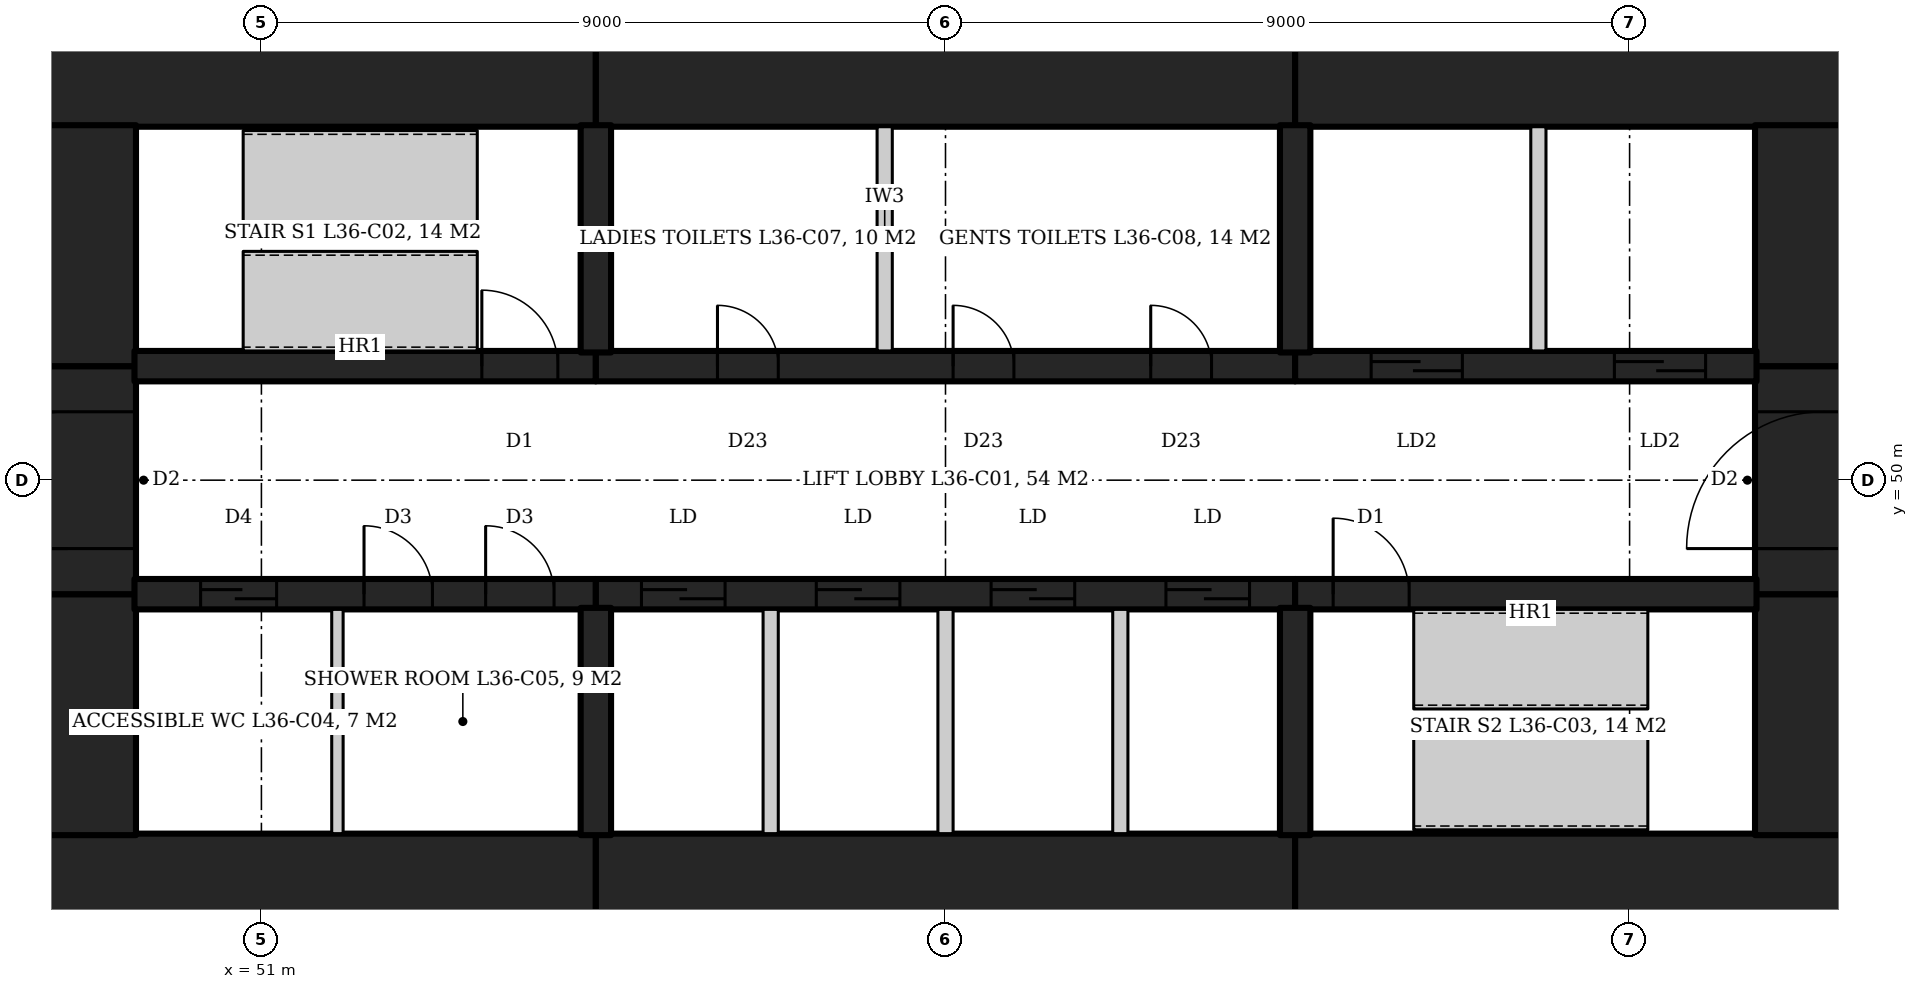
"""IFC4 building model, lengths in metres.
Left out: names, types, materials, properties, quantities, classifications, styles, units other than length and angle.
Written with IfcOpenShell. Run it as: python <this file> out.ifc"""

import sys

from ifc_helpers import new_model, si_unit, direction, frame, frame_2d, origin, place, context, subcontext, project, spatial, rectangle, extrude, element, fill, save


model = new_model("IFC4")
c1 = context("Model", 3, precision=1e-05, world=origin(), true_north=direction((0.0, 1.0)))
c2 = subcontext(c1, "Body", "Model", "MODEL_VIEW")
j1 = project(units=[si_unit("LENGTHUNIT", "METRE"), si_unit("PLANEANGLEUNIT", "RADIAN")], contexts=[c1])
p1 = place(None, origin())
s1 = spatial("IfcSite", under=j1, at=p1, CompositionType="ELEMENT")
p2 = place(p1, origin())
s2 = spatial("IfcBuilding", under=s1, at=p2, CompositionType="ELEMENT")
p3 = place(p2, frame((0.0, 0.0, 160.4)))
s3 = spatial("IfcBuildingStorey", under=s2, at=p3, CompositionType="ELEMENT", Elevation=160.4)
p4 = place(p3, frame((47.55, 55.55, 0.0), z_axis=(0.0, 0.0, 1.0), x_axis=(1.0, 0.0, 0.0)))
e1 = element("IfcWall", 1, at=p4, inside=s3, PredefinedType="SHEAR", context=c2, shape_type="SweptSolid", body=[
    extrude(rectangle(XDim=7.85, YDim=1.8, at=frame_2d((3.925, 0.0))), origin(), (0.0, 0.0, 1.0), 4.2),
])
p5 = place(p3, frame((55.4, 55.55, 0.0), z_axis=(0.0, 0.0, 1.0), x_axis=(1.0, 0.0, 0.0)))
e2 = element("IfcWall", 2, at=p5, inside=s3, PredefinedType="SHEAR", context=c2, shape_type="SweptSolid", body=[
    extrude(rectangle(XDim=9.2, YDim=1.8, at=frame_2d((4.6, 0.0))), origin(), (0.0, 0.0, 1.0), 4.2),
])
for number, where, z_axis, x_axis in (
    (3, (64.6, 55.55, 0.0), (0.0, 0.0, 1.0), (1.0, 0.0, 0.0)),
    (4, (47.55, 44.45, 0.0), (0.0, 0.0, 1.0), (1.0, 0.0, 0.0)),
):
    element("IfcWall", number, at=place(p3, frame(where, z_axis=z_axis, x_axis=x_axis)), inside=s3, PredefinedType="SHEAR", context=c2, shape_type="SweptSolid", body=[
        extrude(rectangle(XDim=7.85, YDim=1.8, at=frame_2d((3.925, 0.0))), origin(), (0.0, 0.0, 1.0), 4.2),
    ])
p6 = place(p3, frame((55.4, 44.45, 0.0), z_axis=(0.0, 0.0, 1.0), x_axis=(1.0, 0.0, 0.0)))
e5 = element("IfcWall", 5, at=p6, inside=s3, PredefinedType="SHEAR", context=c2, shape_type="SweptSolid", body=[
    extrude(rectangle(XDim=9.2, YDim=1.8, at=frame_2d((4.6, 0.0))), origin(), (0.0, 0.0, 1.0), 4.2),
])
p7 = place(p3, frame((64.6, 44.45, 0.0), z_axis=(0.0, 0.0, 1.0), x_axis=(1.0, 0.0, 0.0)))
e6 = element("IfcWall", 6, at=p7, inside=s3, PredefinedType="SHEAR", context=c2, shape_type="SweptSolid", body=[
    extrude(rectangle(XDim=7.85, YDim=1.8, at=frame_2d((3.925, 0.0))), origin(), (0.0, 0.0, 1.0), 4.2),
])
p8 = place(p3, frame((71.55, 45.33, 0.0), z_axis=(0.0, 0.0, 1.0), x_axis=(0.0, 1.0, 0.0)))
e7 = element("IfcWall", 7, at=p8, inside=s3, PredefinedType="SHEAR", context=c2, shape_type="SweptSolid", body=[
    extrude(rectangle(XDim=3.17, YDim=1.8, at=frame_2d((1.585, 0.0))), origin(), (0.0, 0.0, 1.0), 4.2),
])
p9 = place(p3, frame((71.55, 48.5, 0.0), z_axis=(0.0, 0.0, 1.0), x_axis=(0.0, 1.0, 0.0)))
e8 = element("IfcWall", 8, at=p9, inside=s3, PredefinedType="SHEAR", context=c2, shape_type="SweptSolid", body=[
    extrude(rectangle(XDim=3.0, YDim=1.8, at=frame_2d((1.5, 0.0))), origin(), (0.0, 0.0, 1.0), 4.2),
])
p10 = place(p9, frame((0.6, 0.0, 0.0)))
e9 = element("IfcOpeningElement", 9, at=p10, cuts=e8, PredefinedType="OPENING", context=c2, shape_type="SweptSolid", body=[
    extrude(rectangle(XDim=1.8, YDim=2.1, at=frame_2d((0.9, 1.05))), frame((0.0, 0.91, 0.0), z_axis=(0.0, -1.0, 0.0), x_axis=(1.0, 0.0, 0.0)), (0.0, 0.0, 1.0), 1.82),
])
for number, where, z_axis, x_axis in (
    (10, (71.55, 51.5, 0.0), (0.0, 0.0, 1.0), (0.0, 1.0, 0.0)),
    (11, (48.45, 45.33, 0.0), (0.0, 0.0, 1.0), (0.0, 1.0, 0.0)),
):
    element("IfcWall", number, at=place(p3, frame(where, z_axis=z_axis, x_axis=x_axis)), inside=s3, PredefinedType="SHEAR", context=c2, shape_type="SweptSolid", body=[
        extrude(rectangle(XDim=3.17, YDim=1.8, at=frame_2d((1.585, 0.0))), origin(), (0.0, 0.0, 1.0), 4.2),
    ])
p11 = place(p3, frame((48.45, 48.5, 0.0), z_axis=(0.0, 0.0, 1.0), x_axis=(0.0, 1.0, 0.0)))
e12 = element("IfcWall", 12, at=p11, inside=s3, PredefinedType="SHEAR", context=c2, shape_type="SweptSolid", body=[
    extrude(rectangle(XDim=3.0, YDim=1.8, at=frame_2d((1.5, 0.0))), origin(), (0.0, 0.0, 1.0), 4.2),
])
p12 = place(p11, frame((0.6, 0.0, 0.0)))
e13 = element("IfcOpeningElement", 13, at=p12, cuts=e12, PredefinedType="OPENING", context=c2, shape_type="SweptSolid", body=[
    extrude(rectangle(XDim=1.8, YDim=2.1, at=frame_2d((0.9, 1.05))), frame((0.0, 0.91, 0.0), z_axis=(0.0, -1.0, 0.0), x_axis=(1.0, 0.0, 0.0)), (0.0, 0.0, 1.0), 1.82),
])
p13 = place(p3, frame((48.45, 51.5, 0.0), z_axis=(0.0, 0.0, 1.0), x_axis=(0.0, 1.0, 0.0)))
e14 = element("IfcWall", 14, at=p13, inside=s3, PredefinedType="SHEAR", context=c2, shape_type="SweptSolid", body=[
    extrude(rectangle(XDim=3.17, YDim=1.8, at=frame_2d((1.585, 0.0))), origin(), (0.0, 0.0, 1.0), 4.2),
])
p14 = place(p3, frame((49.33, 51.5, 0.0), z_axis=(0.0, 0.0, 1.0), x_axis=(1.0, 0.0, 0.0)))
e15 = element("IfcWall", 15, at=p14, inside=s3, PredefinedType="SHEAR", context=c2, shape_type="SweptSolid", body=[
    extrude(rectangle(XDim=6.07, YDim=0.4, at=frame_2d((3.035, 0.0))), origin(), (0.0, 0.0, 1.0), 4.2),
])
p15 = place(p14, frame((4.57, 0.0, 0.0)))
e16 = element("IfcOpeningElement", 16, at=p15, cuts=e15, PredefinedType="OPENING", context=c2, shape_type="SweptSolid", body=[
    extrude(rectangle(XDim=1.0, YDim=2.1, at=frame_2d((0.5, 1.05))), frame((0.0, 0.21, 0.0), z_axis=(0.0, -1.0, 0.0), x_axis=(1.0, 0.0, 0.0)), (0.0, 0.0, 1.0), 0.42),
])
p16 = place(p3, frame((55.4, 51.5, 0.0), z_axis=(0.0, 0.0, 1.0), x_axis=(1.0, 0.0, 0.0)))
e17 = element("IfcWall", 17, at=p16, inside=s3, PredefinedType="SHEAR", context=c2, shape_type="SweptSolid", body=[
    extrude(rectangle(XDim=9.2, YDim=0.4, at=frame_2d((4.6, 0.0))), origin(), (0.0, 0.0, 1.0), 4.2),
])
p17 = place(p16, frame((1.6, 0.0, 0.0)))
e18 = element("IfcOpeningElement", 18, at=p17, cuts=e17, PredefinedType="OPENING", context=c2, shape_type="SweptSolid", body=[
    extrude(rectangle(XDim=0.8, YDim=2.1, at=frame_2d((0.4, 1.05))), frame((0.0, 0.21, 0.0), z_axis=(0.0, -1.0, 0.0), x_axis=(1.0, 0.0, 0.0)), (0.0, 0.0, 1.0), 0.42),
])
p18 = place(p16, frame((4.7, 0.0, 0.0)))
e19 = element("IfcOpeningElement", 19, at=p18, cuts=e17, PredefinedType="OPENING", context=c2, shape_type="SweptSolid", body=[
    extrude(rectangle(XDim=0.8, YDim=2.1, at=frame_2d((0.4, 1.05))), frame((0.0, 0.21, 0.0), z_axis=(0.0, -1.0, 0.0), x_axis=(1.0, 0.0, 0.0)), (0.0, 0.0, 1.0), 0.42),
])
p19 = place(p16, frame((7.3, 0.0, 0.0)))
e20 = element("IfcOpeningElement", 20, at=p19, cuts=e17, PredefinedType="OPENING", context=c2, shape_type="SweptSolid", body=[
    extrude(rectangle(XDim=0.8, YDim=2.1, at=frame_2d((0.4, 1.05))), frame((0.0, 0.21, 0.0), z_axis=(0.0, -1.0, 0.0), x_axis=(1.0, 0.0, 0.0)), (0.0, 0.0, 1.0), 0.42),
])
p20 = place(p3, frame((64.6, 51.5, 0.0), z_axis=(0.0, 0.0, 1.0), x_axis=(1.0, 0.0, 0.0)))
e21 = element("IfcWall", 21, at=p20, inside=s3, PredefinedType="SHEAR", context=c2, shape_type="SweptSolid", body=[
    extrude(rectangle(XDim=6.07, YDim=0.4, at=frame_2d((3.035, 0.0))), origin(), (0.0, 0.0, 1.0), 4.2),
])
p21 = place(p20, frame((1.0, 0.0, 0.0)))
e22 = element("IfcOpeningElement", 22, at=p21, cuts=e21, PredefinedType="OPENING", context=c2, shape_type="SweptSolid", body=[
    extrude(rectangle(XDim=1.2, YDim=2.1, at=frame_2d((0.6, 1.05))), frame((0.0, 0.21, 0.0), z_axis=(0.0, -1.0, 0.0), x_axis=(1.0, 0.0, 0.0)), (0.0, 0.0, 1.0), 0.42),
])
p22 = place(p20, frame((4.2, 0.0, 0.0)))
e23 = element("IfcOpeningElement", 23, at=p22, cuts=e21, PredefinedType="OPENING", context=c2, shape_type="SweptSolid", body=[
    extrude(rectangle(XDim=1.2, YDim=2.1, at=frame_2d((0.6, 1.05))), frame((0.0, 0.21, 0.0), z_axis=(0.0, -1.0, 0.0), x_axis=(1.0, 0.0, 0.0)), (0.0, 0.0, 1.0), 0.42),
])
p23 = place(p3, frame((49.33, 48.5, 0.0), z_axis=(0.0, 0.0, 1.0), x_axis=(1.0, 0.0, 0.0)))
e24 = element("IfcWall", 24, at=p23, inside=s3, PredefinedType="SHEAR", context=c2, shape_type="SweptSolid", body=[
    extrude(rectangle(XDim=6.07, YDim=0.4, at=frame_2d((3.035, 0.0))), origin(), (0.0, 0.0, 1.0), 4.2),
])
p24 = place(p23, frame((0.87, 0.0, 0.0)))
e25 = element("IfcOpeningElement", 25, at=p24, cuts=e24, PredefinedType="OPENING", context=c2, shape_type="SweptSolid", body=[
    extrude(rectangle(XDim=1.0, YDim=2.1, at=frame_2d((0.5, 1.05))), frame((0.0, 0.21, 0.0), z_axis=(0.0, -1.0, 0.0), x_axis=(1.0, 0.0, 0.0)), (0.0, 0.0, 1.0), 0.42),
])
p25 = place(p23, frame((3.02, 0.0, 0.0)))
e26 = element("IfcOpeningElement", 26, at=p25, cuts=e24, PredefinedType="OPENING", context=c2, shape_type="SweptSolid", body=[
    extrude(rectangle(XDim=0.9, YDim=2.1, at=frame_2d((0.45, 1.05))), frame((0.0, 0.21, 0.0), z_axis=(0.0, -1.0, 0.0), x_axis=(1.0, 0.0, 0.0)), (0.0, 0.0, 1.0), 0.42),
])
p26 = place(p23, frame((4.62, 0.0, 0.0)))
e27 = element("IfcOpeningElement", 27, at=p26, cuts=e24, PredefinedType="OPENING", context=c2, shape_type="SweptSolid", body=[
    extrude(rectangle(XDim=0.9, YDim=2.1, at=frame_2d((0.45, 1.05))), frame((0.0, 0.21, 0.0), z_axis=(0.0, -1.0, 0.0), x_axis=(1.0, 0.0, 0.0)), (0.0, 0.0, 1.0), 0.42),
])
p27 = place(p3, frame((55.4, 48.5, 0.0), z_axis=(0.0, 0.0, 1.0), x_axis=(1.0, 0.0, 0.0)))
e28 = element("IfcWall", 28, at=p27, inside=s3, PredefinedType="SHEAR", context=c2, shape_type="SweptSolid", body=[
    extrude(rectangle(XDim=9.2, YDim=0.4, at=frame_2d((4.6, 0.0))), origin(), (0.0, 0.0, 1.0), 4.2),
])
p28 = place(p27, frame((0.6, 0.0, 0.0)))
e29 = element("IfcOpeningElement", 29, at=p28, cuts=e28, PredefinedType="OPENING", context=c2, shape_type="SweptSolid", body=[
    extrude(rectangle(XDim=1.1, YDim=2.1, at=frame_2d((0.55, 1.05))), frame((0.0, 0.21, 0.0), z_axis=(0.0, -1.0, 0.0), x_axis=(1.0, 0.0, 0.0)), (0.0, 0.0, 1.0), 0.42),
])
p29 = place(p27, frame((2.9, 0.0, 0.0)))
e30 = element("IfcOpeningElement", 30, at=p29, cuts=e28, PredefinedType="OPENING", context=c2, shape_type="SweptSolid", body=[
    extrude(rectangle(XDim=1.1, YDim=2.1, at=frame_2d((0.55, 1.05))), frame((0.0, 0.21, 0.0), z_axis=(0.0, -1.0, 0.0), x_axis=(1.0, 0.0, 0.0)), (0.0, 0.0, 1.0), 0.42),
])
p30 = place(p27, frame((5.2, 0.0, 0.0)))
e31 = element("IfcOpeningElement", 31, at=p30, cuts=e28, PredefinedType="OPENING", context=c2, shape_type="SweptSolid", body=[
    extrude(rectangle(XDim=1.1, YDim=2.1, at=frame_2d((0.55, 1.05))), frame((0.0, 0.21, 0.0), z_axis=(0.0, -1.0, 0.0), x_axis=(1.0, 0.0, 0.0)), (0.0, 0.0, 1.0), 0.42),
])
p31 = place(p27, frame((7.5, 0.0, 0.0)))
e32 = element("IfcOpeningElement", 32, at=p31, cuts=e28, PredefinedType="OPENING", context=c2, shape_type="SweptSolid", body=[
    extrude(rectangle(XDim=1.1, YDim=2.1, at=frame_2d((0.55, 1.05))), frame((0.0, 0.21, 0.0), z_axis=(0.0, -1.0, 0.0), x_axis=(1.0, 0.0, 0.0)), (0.0, 0.0, 1.0), 0.42),
])
p32 = place(p3, frame((64.6, 48.5, 0.0), z_axis=(0.0, 0.0, 1.0), x_axis=(1.0, 0.0, 0.0)))
e33 = element("IfcWall", 33, at=p32, inside=s3, PredefinedType="SHEAR", context=c2, shape_type="SweptSolid", body=[
    extrude(rectangle(XDim=6.07, YDim=0.4, at=frame_2d((3.035, 0.0))), origin(), (0.0, 0.0, 1.0), 4.2),
])
p33 = place(p32, frame((0.5, 0.0, 0.0)))
e34 = element("IfcOpeningElement", 34, at=p33, cuts=e33, PredefinedType="OPENING", context=c2, shape_type="SweptSolid", body=[
    extrude(rectangle(XDim=1.0, YDim=2.1, at=frame_2d((0.5, 1.05))), frame((0.0, 0.21, 0.0), z_axis=(0.0, -1.0, 0.0), x_axis=(1.0, 0.0, 0.0)), (0.0, 0.0, 1.0), 0.42),
])
for number, where, z_axis, x_axis in (
    (35, (55.4, 51.68, 0.0), (0.0, 0.0, 1.0), (0.0, 1.0, 0.0)),
    (36, (64.6, 51.68, 0.0), (0.0, 0.0, 1.0), (0.0, 1.0, 0.0)),
    (37, (55.4, 48.32, 0.0), (0.0, 0.0, 1.0), (0.0, -1.0, 0.0)),
    (38, (64.6, 48.32, 0.0), (0.0, 0.0, 1.0), (0.0, -1.0, 0.0)),
):
    element("IfcWall", number, at=place(p3, frame(where, z_axis=z_axis, x_axis=x_axis)), inside=s3, PredefinedType="SHEAR", context=c2, shape_type="SweptSolid", body=[
        extrude(rectangle(XDim=2.99, YDim=0.4, at=frame_2d((1.495, 0.0))), origin(), (0.0, 0.0, 1.0), 4.2),
    ])
for number, where, z_axis, x_axis in (
    (39, (57.7, 45.35, 0.0), (0.0, 0.0, 1.0), (0.0, 1.0, 0.0)),
    (40, (60.0, 45.35, 0.0), (0.0, 0.0, 1.0), (0.0, 1.0, 0.0)),
    (41, (62.3, 45.35, 0.0), (0.0, 0.0, 1.0), (0.0, 1.0, 0.0)),
    (42, (67.8, 51.7, 0.0), (0.0, 0.0, 1.0), (0.0, 1.0, 0.0)),
):
    element("IfcWall", number, at=place(p3, frame(where, z_axis=z_axis, x_axis=x_axis)), inside=s3, PredefinedType="PARTITIONING", context=c2, shape_type="SweptSolid", body=[
        extrude(rectangle(XDim=2.95, YDim=0.2, at=frame_2d((1.475, 0.0))), origin(), (0.0, 0.0, 1.0), 4.2),
    ])
p34 = place(p3, frame((52.0, 45.35, 0.0), z_axis=(0.0, 0.0, 1.0), x_axis=(0.0, 1.0, 0.0)))
e43 = element("IfcWall", 43, at=p34, inside=s3, PredefinedType="PARTITIONING", context=c2, shape_type="SweptSolid", body=[
    extrude(rectangle(XDim=2.95, YDim=0.15, at=frame_2d((1.475, 0.0))), origin(), (0.0, 0.0, 1.0), 4.04),
])
p35 = place(p3, frame((59.2, 51.7, 0.0), z_axis=(0.0, 0.0, 1.0), x_axis=(0.0, 1.0, 0.0)))
e44 = element("IfcWall", 44, at=p35, inside=s3, PredefinedType="PARTITIONING", context=c2, shape_type="SweptSolid", body=[
    extrude(rectangle(XDim=2.95, YDim=0.2, at=frame_2d((1.475, 0.0))), origin(), (0.0, 0.0, 1.0), 4.04),
])
p36 = place(p15, origin())
e45 = element("IfcDoor", 45, at=p36, inside=s3, OperationType="SINGLE_SWING_LEFT", PredefinedType="DOOR", context=c2, shape_type="SweptSolid", body=[
    extrude(rectangle(XDim=1.0, YDim=2.1, at=frame_2d((0.5, 1.05))), frame((0.0, 0.025, 0.0), z_axis=(0.0, -1.0, 0.0), x_axis=(1.0, 0.0, 0.0)), (0.0, 0.0, 1.0), 0.05),
])
fill(e16, e45)
p37 = place(p33, origin())
e46 = element("IfcDoor", 46, at=p37, inside=s3, OperationType="SINGLE_SWING_LEFT", PredefinedType="DOOR", context=c2, shape_type="SweptSolid", body=[
    extrude(rectangle(XDim=1.0, YDim=2.1, at=frame_2d((0.5, 1.05))), frame((0.0, 0.025, 0.0), z_axis=(0.0, -1.0, 0.0), x_axis=(1.0, 0.0, 0.0)), (0.0, 0.0, 1.0), 0.05),
])
fill(e34, e46)
p38 = place(p21, origin())
e47 = element("IfcDoor", 47, at=p38, inside=s3, OperationType="SLIDING_TO_LEFT", PredefinedType="DOOR", context=c2, shape_type="SweptSolid", body=[
    extrude(rectangle(XDim=1.2, YDim=2.1, at=frame_2d((0.6, 1.05))), frame((0.0, 0.025, 0.0), z_axis=(0.0, -1.0, 0.0), x_axis=(1.0, 0.0, 0.0)), (0.0, 0.0, 1.0), 0.05),
])
fill(e22, e47)
p39 = place(p22, origin())
e48 = element("IfcDoor", 48, at=p39, inside=s3, OperationType="SLIDING_TO_LEFT", PredefinedType="DOOR", context=c2, shape_type="SweptSolid", body=[
    extrude(rectangle(XDim=1.2, YDim=2.1, at=frame_2d((0.6, 1.05))), frame((0.0, 0.025, 0.0), z_axis=(0.0, -1.0, 0.0), x_axis=(1.0, 0.0, 0.0)), (0.0, 0.0, 1.0), 0.05),
])
fill(e23, e48)
p40 = place(p28, origin())
e49 = element("IfcDoor", 49, at=p40, inside=s3, OperationType="SLIDING_TO_LEFT", PredefinedType="DOOR", context=c2, shape_type="SweptSolid", body=[
    extrude(rectangle(XDim=1.1, YDim=2.1, at=frame_2d((0.55, 1.05))), frame((0.0, 0.025, 0.0), z_axis=(0.0, -1.0, 0.0), x_axis=(1.0, 0.0, 0.0)), (0.0, 0.0, 1.0), 0.05),
])
fill(e29, e49)
p41 = place(p29, origin())
e50 = element("IfcDoor", 50, at=p41, inside=s3, OperationType="SLIDING_TO_LEFT", PredefinedType="DOOR", context=c2, shape_type="SweptSolid", body=[
    extrude(rectangle(XDim=1.1, YDim=2.1, at=frame_2d((0.55, 1.05))), frame((0.0, 0.025, 0.0), z_axis=(0.0, -1.0, 0.0), x_axis=(1.0, 0.0, 0.0)), (0.0, 0.0, 1.0), 0.05),
])
fill(e30, e50)
p42 = place(p30, origin())
e51 = element("IfcDoor", 51, at=p42, inside=s3, OperationType="SLIDING_TO_LEFT", PredefinedType="DOOR", context=c2, shape_type="SweptSolid", body=[
    extrude(rectangle(XDim=1.1, YDim=2.1, at=frame_2d((0.55, 1.05))), frame((0.0, 0.025, 0.0), z_axis=(0.0, -1.0, 0.0), x_axis=(1.0, 0.0, 0.0)), (0.0, 0.0, 1.0), 0.05),
])
fill(e31, e51)
p43 = place(p31, origin())
e52 = element("IfcDoor", 52, at=p43, inside=s3, OperationType="SLIDING_TO_LEFT", PredefinedType="DOOR", context=c2, shape_type="SweptSolid", body=[
    extrude(rectangle(XDim=1.1, YDim=2.1, at=frame_2d((0.55, 1.05))), frame((0.0, 0.025, 0.0), z_axis=(0.0, -1.0, 0.0), x_axis=(1.0, 0.0, 0.0)), (0.0, 0.0, 1.0), 0.05),
])
fill(e32, e52)
p44 = place(p24, origin())
e53 = element("IfcDoor", 53, at=p44, inside=s3, OperationType="SLIDING_TO_LEFT", PredefinedType="DOOR", context=c2, shape_type="SweptSolid", body=[
    extrude(rectangle(XDim=1.0, YDim=2.1, at=frame_2d((0.5, 1.05))), frame((0.0, 0.025, 0.0), z_axis=(0.0, -1.0, 0.0), x_axis=(1.0, 0.0, 0.0)), (0.0, 0.0, 1.0), 0.05),
])
fill(e25, e53)
p45 = place(p25, origin())
e54 = element("IfcDoor", 54, at=p45, inside=s3, OperationType="SINGLE_SWING_RIGHT", PredefinedType="DOOR", context=c2, shape_type="SweptSolid", body=[
    extrude(rectangle(XDim=0.9, YDim=2.1, at=frame_2d((0.45, 1.05))), frame((0.0, 0.025, 0.0), z_axis=(0.0, -1.0, 0.0), x_axis=(1.0, 0.0, 0.0)), (0.0, 0.0, 1.0), 0.05),
])
fill(e26, e54)
p46 = place(p26, origin())
e55 = element("IfcDoor", 55, at=p46, inside=s3, OperationType="SINGLE_SWING_RIGHT", PredefinedType="DOOR", context=c2, shape_type="SweptSolid", body=[
    extrude(rectangle(XDim=0.9, YDim=2.1, at=frame_2d((0.45, 1.05))), frame((0.0, 0.025, 0.0), z_axis=(0.0, -1.0, 0.0), x_axis=(1.0, 0.0, 0.0)), (0.0, 0.0, 1.0), 0.05),
])
fill(e27, e55)
p47 = place(p10, origin())
e56 = element("IfcDoor", 56, at=p47, inside=s3, OperationType="DOUBLE_DOOR_DOUBLE_SWING", PredefinedType="DOOR", context=c2, shape_type="SweptSolid", body=[
    extrude(rectangle(XDim=1.8, YDim=2.1, at=frame_2d((0.9, 1.05))), frame((0.0, 0.025, 0.0), z_axis=(0.0, -1.0, 0.0), x_axis=(1.0, 0.0, 0.0)), (0.0, 0.0, 1.0), 0.05),
])
fill(e9, e56)
p48 = place(p12, origin())
e57 = element("IfcDoor", 57, at=p48, inside=s3, OperationType="DOUBLE_DOOR_DOUBLE_SWING", PredefinedType="DOOR", context=c2, shape_type="SweptSolid", body=[
    extrude(rectangle(XDim=1.8, YDim=2.1, at=frame_2d((0.9, 1.05))), frame((0.0, 0.025, 0.0), z_axis=(0.0, -1.0, 0.0), x_axis=(1.0, 0.0, 0.0)), (0.0, 0.0, 1.0), 0.05),
])
fill(e13, e57)
p49 = place(p17, origin())
e58 = element("IfcDoor", 58, at=p49, inside=s3, OperationType="SINGLE_SWING_LEFT", PredefinedType="DOOR", context=c2, shape_type="SweptSolid", body=[
    extrude(rectangle(XDim=0.8, YDim=2.1, at=frame_2d((0.4, 1.05))), frame((0.0, 0.025, 0.0), z_axis=(0.0, -1.0, 0.0), x_axis=(1.0, 0.0, 0.0)), (0.0, 0.0, 1.0), 0.05),
])
fill(e18, e58)
p50 = place(p18, origin())
e59 = element("IfcDoor", 59, at=p50, inside=s3, OperationType="SINGLE_SWING_LEFT", PredefinedType="DOOR", context=c2, shape_type="SweptSolid", body=[
    extrude(rectangle(XDim=0.8, YDim=2.1, at=frame_2d((0.4, 1.05))), frame((0.0, 0.025, 0.0), z_axis=(0.0, -1.0, 0.0), x_axis=(1.0, 0.0, 0.0)), (0.0, 0.0, 1.0), 0.05),
])
fill(e19, e59)
p51 = place(p19, origin())
e60 = element("IfcDoor", 60, at=p51, inside=s3, OperationType="SINGLE_SWING_LEFT", PredefinedType="DOOR", context=c2, shape_type="SweptSolid", body=[
    extrude(rectangle(XDim=0.8, YDim=2.1, at=frame_2d((0.4, 1.05))), frame((0.0, 0.025, 0.0), z_axis=(0.0, -1.0, 0.0), x_axis=(1.0, 0.0, 0.0)), (0.0, 0.0, 1.0), 0.05),
])
fill(e20, e60)
save(model, sys.argv[1])
